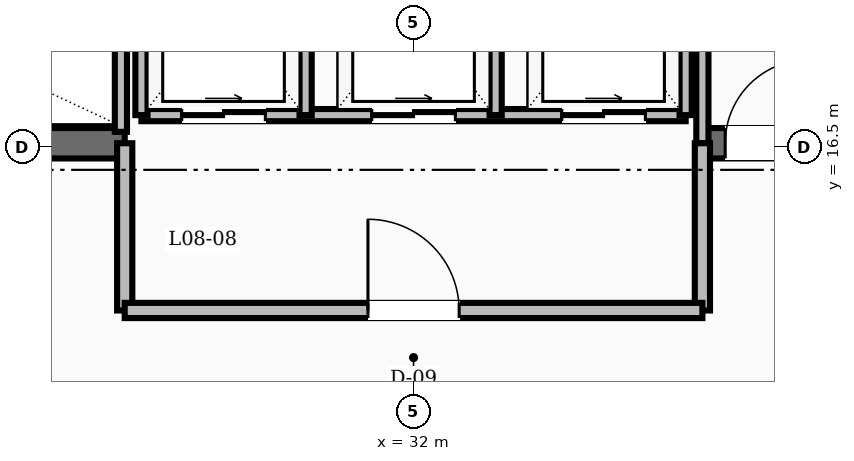
"""IFC4 building model, lengths in metres.
Left out: names, types, materials, properties, quantities, classifications, styles, units other than length and angle.
Written with IfcOpenShell. Run it as: python <this file> out.ifc"""

import sys

from ifc_helpers import new_model, si_unit, direction, frame, frame_2d, origin, place, context, subcontext, project, spatial, rectangle, extrude, element, fill, save


model = new_model("IFC4")
c1 = context("Model", 3, precision=1e-05, world=origin(), true_north=direction((0.0, 1.0)))
c2 = subcontext(c1, "Body", "Model", "MODEL_VIEW")
j1 = project(units=[si_unit("LENGTHUNIT", "METRE"), si_unit("PLANEANGLEUNIT", "RADIAN")], contexts=[c1])
p1 = place(None, origin())
s1 = spatial("IfcSite", under=j1, at=p1, CompositionType="ELEMENT")
p2 = place(p1, origin())
s2 = spatial("IfcBuilding", under=s1, at=p2, CompositionType="ELEMENT")
p3 = place(p2, frame((0.0, 0.0, 37.6)))
s3 = spatial("IfcBuildingStorey", under=s2, at=p3, CompositionType="ELEMENT", Elevation=37.6)
p4 = place(p3, frame((25.0, 16.55, 0.0), z_axis=(0.0, 0.0, 1.0), x_axis=(1.0, 0.0, 0.0)))
e1 = element("IfcWall", 1, at=p4, inside=s3, PredefinedType="SHEAR", context=c2, shape_type="SweptSolid", body=[
    extrude(rectangle(XDim=3.2, YDim=0.4, at=frame_2d((1.6, 0.0))), origin(), (0.0, 0.0, 1.0), 3.6),
])
p5 = place(p3, frame((35.8, 16.55, 0.0), z_axis=(0.0, 0.0, 1.0), x_axis=(1.0, 0.0, 0.0)))
e2 = element("IfcWall", 2, at=p5, inside=s3, PredefinedType="SHEAR", context=c2, shape_type="SweptSolid", body=[
    extrude(rectangle(XDim=3.2, YDim=0.4, at=frame_2d((1.6, 0.0))), origin(), (0.0, 0.0, 1.0), 3.6),
])
p6 = place(p5, frame((0.3, 0.0, 0.0)))
e3 = element("IfcOpeningElement", 3, at=p6, cuts=e2, PredefinedType="OPENING", context=c2, shape_type="SweptSolid", body=[
    extrude(rectangle(XDim=1.1, YDim=2.1, at=frame_2d((0.55, 1.05))), frame((0.0, 0.21, 0.0), z_axis=(0.0, -1.0, 0.0), x_axis=(1.0, 0.0, 0.0)), (0.0, 0.0, 1.0), 0.42),
])
p7 = place(p3, frame((35.8, 16.55, 0.0), z_axis=(0.0, 0.0, 1.0), x_axis=(0.0, 1.0, 0.0)))
e4 = element("IfcWall", 4, at=p7, inside=s3, PredefinedType="SOLIDWALL", context=c2, shape_type="SweptSolid", body=[
    extrude(rectangle(XDim=3.3, YDim=0.16, at=frame_2d((1.65, 0.0))), origin(), (0.0, 0.0, 1.0), 2.61),
])
for number, where, z_axis, x_axis in (
    (5, (28.2, 14.35, 0.0), (0.0, 0.0, 1.0), (0.0, 1.0, 0.0)),
    (6, (35.8, 14.35, 0.0), (0.0, 0.0, 1.0), (0.0, 1.0, 0.0)),
):
    element("IfcWall", number, at=place(p3, frame(where, z_axis=z_axis, x_axis=x_axis)), inside=s3, PredefinedType="SOLIDWALL", context=c2, shape_type="SweptSolid", body=[
        extrude(rectangle(XDim=2.2, YDim=0.2, at=frame_2d((1.1, 0.0))), origin(), (0.0, 0.0, 1.0), 2.61),
    ])
p8 = place(p3, frame((28.2, 14.35, 0.0), z_axis=(0.0, 0.0, 1.0), x_axis=(1.0, 0.0, 0.0)))
e7 = element("IfcWall", 7, at=p8, inside=s3, PredefinedType="SOLIDWALL", context=c2, shape_type="SweptSolid", body=[
    extrude(rectangle(XDim=7.6, YDim=0.2, at=frame_2d((3.8, 0.0))), origin(), (0.0, 0.0, 1.0), 2.61),
])
p9 = place(p8, frame((3.2, 0.0, 0.0)))
e8 = element("IfcOpeningElement", 8, at=p9, cuts=e7, PredefinedType="OPENING", context=c2, shape_type="SweptSolid", body=[
    extrude(rectangle(XDim=1.2, YDim=2.1, at=frame_2d((0.6, 1.05))), frame((0.0, 0.11, 0.0), z_axis=(0.0, -1.0, 0.0), x_axis=(1.0, 0.0, 0.0)), (0.0, 0.0, 1.0), 0.22),
])
p10 = place(p3, frame((28.42, 16.92, 0.0), z_axis=(0.0, 0.0, 1.0), x_axis=(1.0, 0.0, 0.0)))
e9 = element("IfcWall", 9, at=p10, inside=s3, PredefinedType="SOLIDWALL", context=c2, shape_type="SweptSolid", body=[
    extrude(rectangle(XDim=7.16, YDim=0.16, at=frame_2d((3.58, 0.0))), origin(), (0.0, 0.0, 1.0), 2.61),
])
p11 = place(p10, frame((0.53, 0.0, 0.0)))
e10 = element("IfcOpeningElement", 10, at=p11, cuts=e9, PredefinedType="OPENING", context=c2, shape_type="SweptSolid", body=[
    extrude(rectangle(XDim=1.1, YDim=2.15, at=frame_2d((0.55, 1.075))), frame((0.0, 0.09, 0.0), z_axis=(0.0, -1.0, 0.0), x_axis=(1.0, 0.0, 0.0)), (0.0, 0.0, 1.0), 0.18),
])
p12 = place(p10, frame((3.03, 0.0, 0.0)))
e11 = element("IfcOpeningElement", 11, at=p12, cuts=e9, PredefinedType="OPENING", context=c2, shape_type="SweptSolid", body=[
    extrude(rectangle(XDim=1.1, YDim=2.15, at=frame_2d((0.55, 1.075))), frame((0.0, 0.09, 0.0), z_axis=(0.0, -1.0, 0.0), x_axis=(1.0, 0.0, 0.0)), (0.0, 0.0, 1.0), 0.18),
])
p13 = place(p10, frame((5.53, 0.0, 0.0)))
e12 = element("IfcOpeningElement", 12, at=p13, cuts=e9, PredefinedType="OPENING", context=c2, shape_type="SweptSolid", body=[
    extrude(rectangle(XDim=1.1, YDim=2.15, at=frame_2d((0.55, 1.075))), frame((0.0, 0.09, 0.0), z_axis=(0.0, -1.0, 0.0), x_axis=(1.0, 0.0, 0.0)), (0.0, 0.0, 1.0), 0.18),
])
for number, where, z_axis, x_axis in (
    (13, (28.42, 16.92, 0.0), (0.0, 0.0, 1.0), (0.0, 1.0, 0.0)),
    (14, (30.58, 16.92, 0.0), (0.0, 0.0, 1.0), (0.0, 1.0, 0.0)),
    (15, (33.08, 16.92, 0.0), (0.0, 0.0, 1.0), (0.0, 1.0, 0.0)),
    (16, (35.58, 16.92, 0.0), (0.0, 0.0, 1.0), (0.0, 1.0, 0.0)),
):
    element("IfcWall", number, at=place(p3, frame(where, z_axis=z_axis, x_axis=x_axis)), inside=s3, PredefinedType="SOLIDWALL", context=c2, shape_type="SweptSolid", body=[
        extrude(rectangle(XDim=2.76, YDim=0.16, at=frame_2d((1.38, 0.0))), origin(), (0.0, 0.0, 1.0), 2.61),
    ])
p14 = place(p3, frame((28.15, 16.7, 0.0), z_axis=(0.0, 0.0, 1.0), x_axis=(0.0, 1.0, 0.0)))
e17 = element("IfcWall", 17, at=p14, inside=s3, PredefinedType="SOLIDWALL", context=c2, shape_type="SweptSolid", body=[
    extrude(rectangle(XDim=6.05, YDim=0.16, at=frame_2d((3.025, 0.0))), origin(), (0.0, 0.0, 1.0), 2.61),
])
p15 = place(p6, origin())
e18 = element("IfcDoor", 18, at=p15, inside=s3, OperationType="SINGLE_SWING_RIGHT", PredefinedType="DOOR", context=c2, shape_type="SweptSolid", body=[
    extrude(rectangle(XDim=1.1, YDim=2.1, at=frame_2d((0.55, 1.05))), frame((0.0, 0.025, 0.0), z_axis=(0.0, -1.0, 0.0), x_axis=(1.0, 0.0, 0.0)), (0.0, 0.0, 1.0), 0.05),
])
fill(e3, e18)
p16 = place(p9, origin())
e19 = element("IfcDoor", 19, at=p16, inside=s3, OperationType="SINGLE_SWING_LEFT", PredefinedType="DOOR", context=c2, shape_type="SweptSolid", body=[
    extrude(rectangle(XDim=1.2, YDim=2.1, at=frame_2d((0.6, 1.05))), frame((0.0, 0.025, 0.0), z_axis=(0.0, -1.0, 0.0), x_axis=(1.0, 0.0, 0.0)), (0.0, 0.0, 1.0), 0.05),
])
fill(e8, e19)
p17 = place(p11, origin())
e20 = element("IfcDoor", 20, at=p17, inside=s3, OperationType="SLIDING_TO_RIGHT", PredefinedType="DOOR", context=c2, shape_type="SweptSolid", body=[
    extrude(rectangle(XDim=1.1, YDim=2.15, at=frame_2d((0.55, 1.075))), frame((0.0, 0.025, 0.0), z_axis=(0.0, -1.0, 0.0), x_axis=(1.0, 0.0, 0.0)), (0.0, 0.0, 1.0), 0.05),
])
fill(e10, e20)
p18 = place(p12, origin())
e21 = element("IfcDoor", 21, at=p18, inside=s3, OperationType="SLIDING_TO_RIGHT", PredefinedType="DOOR", context=c2, shape_type="SweptSolid", body=[
    extrude(rectangle(XDim=1.1, YDim=2.15, at=frame_2d((0.55, 1.075))), frame((0.0, 0.025, 0.0), z_axis=(0.0, -1.0, 0.0), x_axis=(1.0, 0.0, 0.0)), (0.0, 0.0, 1.0), 0.05),
])
fill(e11, e21)
p19 = place(p13, origin())
e22 = element("IfcDoor", 22, at=p19, inside=s3, OperationType="SLIDING_TO_RIGHT", PredefinedType="DOOR", context=c2, shape_type="SweptSolid", body=[
    extrude(rectangle(XDim=1.1, YDim=2.15, at=frame_2d((0.55, 1.075))), frame((0.0, 0.025, 0.0), z_axis=(0.0, -1.0, 0.0), x_axis=(1.0, 0.0, 0.0)), (0.0, 0.0, 1.0), 0.05),
])
fill(e12, e22)
save(model, sys.argv[1])
